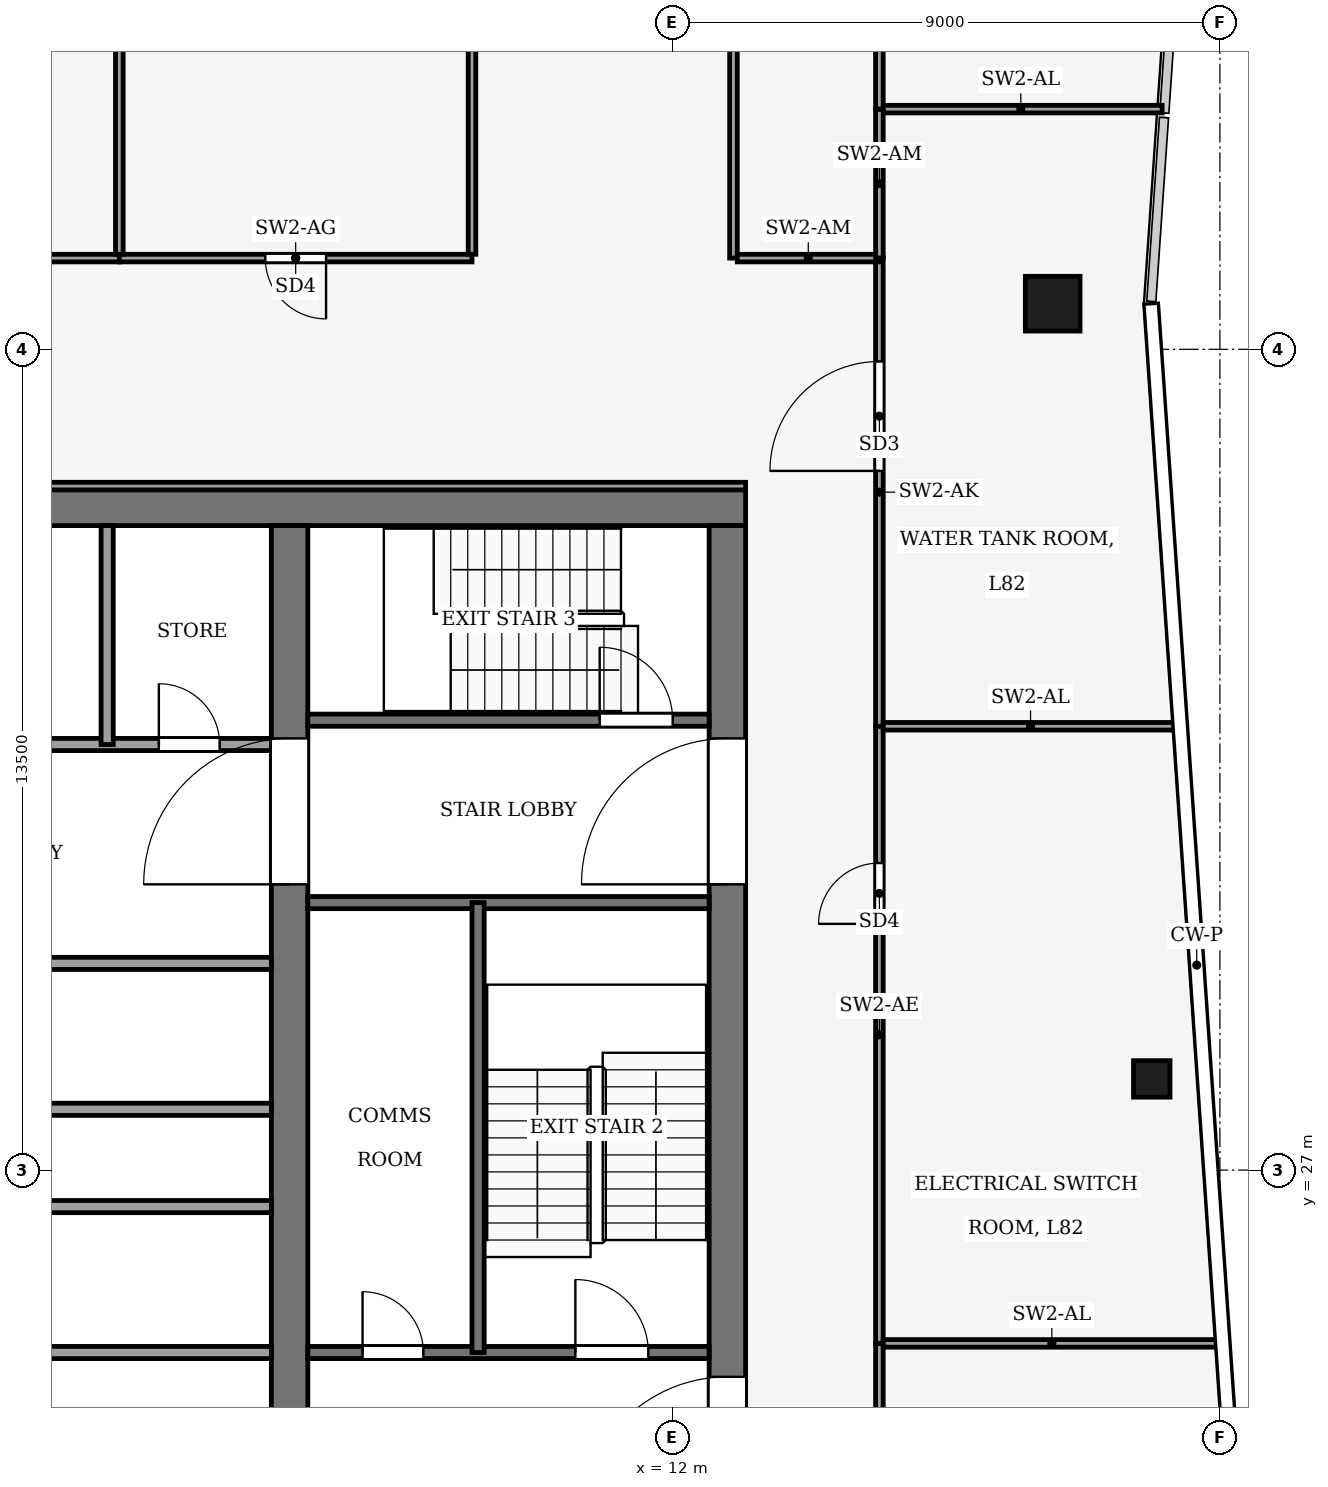
"""IFC4 building model, lengths in metres.
Left out: names, types, materials, properties, quantities, classifications, styles, units other than length and angle.
Written with IfcOpenShell. Run it as: python <this file> out.ifc"""

import sys

from ifc_helpers import new_model, si_unit, direction, frame, frame_2d, origin, origin_2d, place, context, subcontext, project, spatial, rectangle, hollow_rectangle, extrude, element, fill, save


model = new_model("IFC4")
c1 = context("Model", 3, precision=1e-05, world=origin(), true_north=direction((0.0, 1.0)))
c2 = subcontext(c1, "Body", "Model", "MODEL_VIEW")
j1 = project(units=[si_unit("LENGTHUNIT", "METRE"), si_unit("PLANEANGLEUNIT", "RADIAN")], contexts=[c1])
p1 = place(None, origin())
s1 = spatial("IfcSite", under=j1, at=p1, CompositionType="ELEMENT")
p2 = place(p1, origin())
s2 = spatial("IfcBuilding", under=s1, at=p2, CompositionType="ELEMENT")
p3 = place(p2, frame((0.0, 0.0, 364.0)))
s3 = spatial("IfcBuildingStorey", under=s2, at=p3, CompositionType="ELEMENT", Elevation=364.0)
p4 = place(p3, frame((-13.2, 37.9, -0.15), z_axis=(0.0, 0.0, 1.0), x_axis=(1.0, 0.0, 0.0)))
e1 = element("IfcWall", 1, at=p4, inside=s3, PredefinedType="SHEAR", context=c2, shape_type="SweptSolid", body=[
    extrude(rectangle(XDim=26.4, YDim=0.6, at=frame_2d((13.2, 0.0))), origin(), (0.0, 0.0, 1.0), 4.0),
])
p5 = place(p3, frame((12.9, 18.4, -0.15), z_axis=(0.0, 0.0, 1.0), x_axis=(0.0, 1.0, 0.0)))
e2 = element("IfcWall", 2, at=p5, inside=s3, PredefinedType="SHEAR", context=c2, shape_type="SweptSolid", body=[
    extrude(rectangle(XDim=19.2, YDim=0.6, at=frame_2d((9.6, 0.0))), origin(), (0.0, 0.0, 1.0), 4.0),
])
p6 = place(p5, frame((2.8, 0.0, 0.15)))
e3 = element("IfcOpeningElement", 3, at=p6, cuts=e2, PredefinedType="OPENING", context=c2, shape_type="SweptSolid", body=[
    extrude(rectangle(XDim=2.4, YDim=2.4, at=frame_2d((1.2, 1.2))), frame((0.0, 0.31, 0.0), z_axis=(0.0, -1.0, 0.0), x_axis=(1.0, 0.0, 0.0)), (0.0, 0.0, 1.0), 0.62),
])
p7 = place(p5, frame((13.3, 0.0, 0.15)))
e4 = element("IfcOpeningElement", 4, at=p7, cuts=e2, PredefinedType="OPENING", context=c2, shape_type="SweptSolid", body=[
    extrude(rectangle(XDim=2.4, YDim=2.4, at=frame_2d((1.2, 1.2))), frame((0.0, 0.31, 0.0), z_axis=(0.0, -1.0, 0.0), x_axis=(1.0, 0.0, 0.0)), (0.0, 0.0, 1.0), 0.62),
])
p8 = place(p3, frame((5.7, 18.4, -0.15), z_axis=(0.0, 0.0, 1.0), x_axis=(0.0, 1.0, 0.0)))
e5 = element("IfcWall", 5, at=p8, inside=s3, PredefinedType="SHEAR", context=c2, shape_type="SweptSolid", body=[
    extrude(rectangle(XDim=19.2, YDim=0.6, at=frame_2d((9.6, 0.0))), origin(), (0.0, 0.0, 1.0), 4.0),
])
p9 = place(p8, frame((13.3, 0.0, 0.15)))
e6 = element("IfcOpeningElement", 6, at=p9, cuts=e5, PredefinedType="OPENING", context=c2, shape_type="SweptSolid", body=[
    extrude(rectangle(XDim=2.4, YDim=2.4, at=frame_2d((1.2, 1.2))), frame((0.0, 0.31, 0.0), z_axis=(0.0, -1.0, 0.0), x_axis=(1.0, 0.0, 0.0)), (0.0, 0.0, 1.0), 0.62),
])
p10 = place(p3, frame((18.25, 41.25, 0.0), z_axis=(0.0, 0.0, 1.0), x_axis=(1.0, 0.0, 0.0)))
e7 = element("IfcColumn", 7, at=p10, inside=s3, PredefinedType="COLUMN", context=c2, shape_type="SweptSolid", body=[
    extrude(hollow_rectangle(XDim=0.9, YDim=0.9, WallThickness=0.04, at=origin_2d()), origin(), (0.0, 0.0, 1.0), 4.0),
])
p11 = place(p3, frame((19.879, 28.5, 0.0), z_axis=(0.0, 0.0, 1.0), x_axis=(1.0, 0.0, 0.0)))
e8 = element("IfcColumn", 8, at=p11, inside=s3, PredefinedType="COLUMN", context=c2, shape_type="SweptSolid", body=[
    extrude(hollow_rectangle(XDim=0.6, YDim=0.6, WallThickness=0.025, at=origin_2d()), origin(), (0.0, 0.0, 1.0), 4.0),
])
p12 = place(p3, frame((-5.4, 24.0, 0.0), z_axis=(0.0, 0.0, 1.0), x_axis=(1.0, 0.0, 0.0)))
e9 = element("IfcWall", 9, at=p12, inside=s3, PredefinedType="PARTITIONING", context=c2, shape_type="SweptSolid", body=[
    extrude(rectangle(XDim=10.8, YDim=0.2, at=frame_2d((5.4, 0.0))), origin(), (0.0, 0.0, 1.0), 3.85),
])
p13 = place(p12, frame((4.9, 0.0, 0.0)))
e10 = element("IfcOpeningElement", 10, at=p13, cuts=e9, PredefinedType="OPENING", context=c2, shape_type="SweptSolid", body=[
    extrude(rectangle(XDim=1.0, YDim=2.1, at=frame_2d((0.5, 1.05))), frame((0.0, 0.11, 0.0), z_axis=(0.0, -1.0, 0.0), x_axis=(1.0, 0.0, 0.0)), (0.0, 0.0, 1.0), 0.22),
])
p14 = place(p3, frame((6.0, 24.0, 0.0), z_axis=(0.0, 0.0, 1.0), x_axis=(1.0, 0.0, 0.0)))
e11 = element("IfcWall", 11, at=p14, inside=s3, PredefinedType="PARTITIONING", context=c2, shape_type="SweptSolid", body=[
    extrude(rectangle(XDim=6.6, YDim=0.2, at=frame_2d((3.3, 0.0))), origin(), (0.0, 0.0, 1.0), 3.85),
])
p15 = place(p14, frame((0.9, 0.0, 0.0)))
e12 = element("IfcOpeningElement", 12, at=p15, cuts=e11, PredefinedType="OPENING", context=c2, shape_type="SweptSolid", body=[
    extrude(rectangle(XDim=1.0, YDim=2.1, at=frame_2d((0.5, 1.05))), frame((0.0, 0.11, 0.0), z_axis=(0.0, -1.0, 0.0), x_axis=(1.0, 0.0, 0.0)), (0.0, 0.0, 1.0), 0.22),
])
p16 = place(p14, frame((4.4, 0.0, 0.0)))
e13 = element("IfcOpeningElement", 13, at=p16, cuts=e11, PredefinedType="OPENING", context=c2, shape_type="SweptSolid", body=[
    extrude(rectangle(XDim=1.2, YDim=2.2, at=frame_2d((0.6, 1.1))), frame((0.0, 0.11, 0.0), z_axis=(0.0, -1.0, 0.0), x_axis=(1.0, 0.0, 0.0)), (0.0, 0.0, 1.0), 0.22),
])
for number, where, z_axis, x_axis in (
    (14, (-5.4, 26.4, 0.0), (0.0, 0.0, 1.0), (1.0, 0.0, 0.0)),
    (15, (-5.4, 28.0, 0.0), (0.0, 0.0, 1.0), (1.0, 0.0, 0.0)),
):
    element("IfcWall", number, at=place(p3, frame(where, z_axis=z_axis, x_axis=x_axis)), inside=s3, PredefinedType="PARTITIONING", context=c2, shape_type="SweptSolid", body=[
        extrude(rectangle(XDim=10.8, YDim=0.2, at=frame_2d((5.4, 0.0))), origin(), (0.0, 0.0, 1.0), 3.85),
    ])
p17 = place(p3, frame((-5.4, 30.4, 0.0), z_axis=(0.0, 0.0, 1.0), x_axis=(1.0, 0.0, 0.0)))
e16 = element("IfcWall", 16, at=p17, inside=s3, PredefinedType="PARTITIONING", context=c2, shape_type="SweptSolid", body=[
    extrude(rectangle(XDim=10.8, YDim=0.2, at=frame_2d((5.4, 0.0))), origin(), (0.0, 0.0, 1.0), 3.85),
])
p18 = place(p17, frame((4.9, 0.0, 0.0)))
e17 = element("IfcOpeningElement", 17, at=p18, cuts=e16, PredefinedType="OPENING", context=c2, shape_type="SweptSolid", body=[
    extrude(rectangle(XDim=1.0, YDim=2.1, at=frame_2d((0.5, 1.05))), frame((0.0, 0.11, 0.0), z_axis=(0.0, -1.0, 0.0), x_axis=(1.0, 0.0, 0.0)), (0.0, 0.0, 1.0), 0.22),
])
p19 = place(p3, frame((6.0, 31.4, 0.0), z_axis=(0.0, 0.0, 1.0), x_axis=(1.0, 0.0, 0.0)))
e18 = element("IfcWall", 18, at=p19, inside=s3, PredefinedType="PARTITIONING", context=c2, shape_type="SweptSolid", body=[
    extrude(rectangle(XDim=6.6, YDim=0.2, at=frame_2d((3.3, 0.0))), origin(), (0.0, 0.0, 1.0), 3.85),
])
p20 = place(p3, frame((-5.4, 34.0, 0.0), z_axis=(0.0, 0.0, 1.0), x_axis=(1.0, 0.0, 0.0)))
e19 = element("IfcWall", 19, at=p20, inside=s3, PredefinedType="PARTITIONING", context=c2, shape_type="SweptSolid", body=[
    extrude(rectangle(XDim=10.8, YDim=0.2, at=frame_2d((5.4, 0.0))), origin(), (0.0, 0.0, 1.0), 3.85),
])
p21 = place(p20, frame((3.55, 0.0, 0.0)))
e20 = element("IfcOpeningElement", 20, at=p21, cuts=e19, PredefinedType="OPENING", context=c2, shape_type="SweptSolid", body=[
    extrude(rectangle(XDim=1.0, YDim=2.1, at=frame_2d((0.5, 1.05))), frame((0.0, 0.11, 0.0), z_axis=(0.0, -1.0, 0.0), x_axis=(1.0, 0.0, 0.0)), (0.0, 0.0, 1.0), 0.22),
])
p22 = place(p20, frame((8.95, 0.0, 0.0)))
e21 = element("IfcOpeningElement", 21, at=p22, cuts=e19, PredefinedType="OPENING", context=c2, shape_type="SweptSolid", body=[
    extrude(rectangle(XDim=1.0, YDim=2.1, at=frame_2d((0.5, 1.05))), frame((0.0, 0.11, 0.0), z_axis=(0.0, -1.0, 0.0), x_axis=(1.0, 0.0, 0.0)), (0.0, 0.0, 1.0), 0.22),
])
p23 = place(p3, frame((6.0, 34.4, 0.0), z_axis=(0.0, 0.0, 1.0), x_axis=(1.0, 0.0, 0.0)))
e22 = element("IfcWall", 22, at=p23, inside=s3, PredefinedType="PARTITIONING", context=c2, shape_type="SweptSolid", body=[
    extrude(rectangle(XDim=6.6, YDim=0.2, at=frame_2d((3.3, 0.0))), origin(), (0.0, 0.0, 1.0), 3.85),
])
p24 = place(p23, frame((4.8, 0.0, 0.0)))
e23 = element("IfcOpeningElement", 23, at=p24, cuts=e22, PredefinedType="OPENING", context=c2, shape_type="SweptSolid", body=[
    extrude(rectangle(XDim=1.2, YDim=2.2, at=frame_2d((0.6, 1.1))), frame((0.0, 0.11, 0.0), z_axis=(0.0, -1.0, 0.0), x_axis=(1.0, 0.0, 0.0)), (0.0, 0.0, 1.0), 0.22),
])
p25 = place(p3, frame((2.7, 34.0, 0.0), z_axis=(0.0, 0.0, 1.0), x_axis=(0.0, 1.0, 0.0)))
e24 = element("IfcWall", 24, at=p25, inside=s3, PredefinedType="PARTITIONING", context=c2, shape_type="SweptSolid", body=[
    extrude(rectangle(XDim=3.6, YDim=0.2, at=frame_2d((1.8, 0.0))), origin(), (0.0, 0.0, 1.0), 3.85),
])
p26 = place(p3, frame((8.8, 24.0, 0.0), z_axis=(0.0, 0.0, 1.0), x_axis=(0.0, 1.0, 0.0)))
e25 = element("IfcWall", 25, at=p26, inside=s3, PredefinedType="PARTITIONING", context=c2, shape_type="SweptSolid", body=[
    extrude(rectangle(XDim=7.4, YDim=0.2, at=frame_2d((3.7, 0.0))), origin(), (0.0, 0.0, 1.0), 3.85),
])
p27 = place(p3, frame((2.9, 42.0, 0.0), z_axis=(0.0, 0.0, 1.0), x_axis=(-1.0, 0.0, 0.0)))
e26 = element("IfcWall", 26, at=p27, inside=s3, PredefinedType="PARTITIONING", context=c2, shape_type="SweptSolid", body=[
    extrude(rectangle(XDim=5.8, YDim=0.125, at=frame_2d((2.9, 0.0))), origin(), (0.0, 0.0, 1.0), 3.37),
])
p28 = place(p27, frame((2.0, 0.0, 0.0)))
e27 = element("IfcOpeningElement", 27, at=p28, cuts=e26, PredefinedType="OPENING", context=c2, shape_type="SweptSolid", body=[
    extrude(rectangle(XDim=1.8, YDim=2.4, at=frame_2d((0.9, 1.2))), frame((0.0, 0.073, 0.0), z_axis=(0.0, -1.0, 0.0), x_axis=(1.0, 0.0, 0.0)), (0.0, 0.0, 1.0), 0.145),
])
p29 = place(p3, frame((8.7, 42.0, 0.0), z_axis=(0.0, 0.0, 1.0), x_axis=(-1.0, 0.0, 0.0)))
e28 = element("IfcWall", 28, at=p29, inside=s3, PredefinedType="PARTITIONING", context=c2, shape_type="SweptSolid", body=[
    extrude(rectangle(XDim=5.8, YDim=0.125, at=frame_2d((2.9, 0.0))), origin(), (0.0, 0.0, 1.0), 3.37),
])
p30 = place(p29, frame((2.4, 0.0, 0.0)))
e29 = element("IfcOpeningElement", 29, at=p30, cuts=e28, PredefinedType="OPENING", context=c2, shape_type="SweptSolid", body=[
    extrude(rectangle(XDim=1.0, YDim=2.1, at=frame_2d((0.5, 1.05))), frame((0.0, 0.073, 0.0), z_axis=(0.0, -1.0, 0.0), x_axis=(1.0, 0.0, 0.0)), (0.0, 0.0, 1.0), 0.145),
])
p31 = place(p3, frame((8.7, 42.062, 0.0), z_axis=(0.0, 0.0, 1.0), x_axis=(0.0, 1.0, 0.0)))
e30 = element("IfcWall", 30, at=p31, inside=s3, PredefinedType="PARTITIONING", context=c2, shape_type="SweptSolid", body=[
    extrude(rectangle(XDim=12.538, YDim=0.125, at=frame_2d((6.269, 0.0))), origin(), (0.0, 0.0, 1.0), 3.22),
])
p32 = place(p3, frame((15.4, 13.45, 0.0), z_axis=(0.0, 0.0, 1.0), x_axis=(0.0, 1.0, 0.0)))
e31 = element("IfcWall", 31, at=p32, inside=s3, PredefinedType="PARTITIONING", context=c2, shape_type="SweptSolid", body=[
    extrude(rectangle(XDim=10.7, YDim=0.125, at=frame_2d((5.35, 0.0))), origin(), (0.0, 0.0, 1.0), 2.812),
])
p33 = place(p32, frame((4.739, 0.0, 0.0)))
e32 = element("IfcOpeningElement", 32, at=p33, cuts=e31, PredefinedType="OPENING", context=c2, shape_type="SweptSolid", body=[
    extrude(rectangle(XDim=1.8, YDim=2.4, at=frame_2d((0.9, 1.2))), frame((0.0, 0.073, 0.0), z_axis=(0.0, -1.0, 0.0), x_axis=(1.0, 0.0, 0.0)), (0.0, 0.0, 1.0), 0.145),
])
p34 = place(p3, frame((15.4, 24.15, 0.0), z_axis=(0.0, 0.0, 1.0), x_axis=(0.0, 1.0, 0.0)))
e33 = element("IfcWall", 33, at=p34, inside=s3, PredefinedType="PARTITIONING", context=c2, shape_type="SweptSolid", body=[
    extrude(rectangle(XDim=10.15, YDim=0.125, at=frame_2d((5.075, 0.0))), origin(), (0.0, 0.0, 1.0), 3.52),
])
p35 = place(p34, frame((6.9, 0.0, 0.0)))
e34 = element("IfcOpeningElement", 34, at=p35, cuts=e33, PredefinedType="OPENING", context=c2, shape_type="SweptSolid", body=[
    extrude(rectangle(XDim=1.0, YDim=2.1, at=frame_2d((0.5, 1.05))), frame((0.0, 0.073, 0.0), z_axis=(0.0, -1.0, 0.0), x_axis=(1.0, 0.0, 0.0)), (0.0, 0.0, 1.0), 0.145),
])
p36 = place(p3, frame((15.4, 34.3, 0.0), z_axis=(0.0, 0.0, 1.0), x_axis=(0.0, 1.0, 0.0)))
e35 = element("IfcWall", 35, at=p36, inside=s3, PredefinedType="PARTITIONING", context=c2, shape_type="SweptSolid", body=[
    extrude(rectangle(XDim=7.7, YDim=0.125, at=frame_2d((3.85, 0.0))), origin(), (0.0, 0.0, 1.0), 3.12),
])
p37 = place(p36, frame((4.2, 0.0, 0.0)))
e36 = element("IfcOpeningElement", 36, at=p37, cuts=e35, PredefinedType="OPENING", context=c2, shape_type="SweptSolid", body=[
    extrude(rectangle(XDim=1.8, YDim=2.4, at=frame_2d((0.9, 1.2))), frame((0.0, 0.073, 0.0), z_axis=(0.0, -1.0, 0.0), x_axis=(1.0, 0.0, 0.0)), (0.0, 0.0, 1.0), 0.145),
])
p38 = place(p3, frame((2.9, 54.538, 0.0), z_axis=(0.0, 0.0, 1.0), x_axis=(0.0, -1.0, 0.0)))
e37 = element("IfcWall", 37, at=p38, inside=s3, PredefinedType="PARTITIONING", context=c2, shape_type="SweptSolid", body=[
    extrude(rectangle(XDim=12.475, YDim=0.125, at=frame_2d((6.238, 0.0))), origin(), (0.0, 0.0, 1.0), 3.22),
])
p39 = place(p3, frame((15.462, 24.15, 0.0), z_axis=(0.0, 0.0, 1.0), x_axis=(1.0, 0.0, 0.0)))
e38 = element("IfcWall", 38, at=p39, inside=s3, PredefinedType="PARTITIONING", context=c2, shape_type="SweptSolid", body=[
    extrude(rectangle(XDim=5.547, YDim=0.125, at=frame_2d((2.773, 0.0))), origin(), (0.0, 0.0, 1.0), 3.02),
])
p40 = place(p3, frame((15.462, 34.3, 0.0), z_axis=(0.0, 0.0, 1.0), x_axis=(1.0, 0.0, 0.0)))
e39 = element("IfcWall", 39, at=p40, inside=s3, PredefinedType="PARTITIONING", context=c2, shape_type="SweptSolid", body=[
    extrude(rectangle(XDim=4.847, YDim=0.125, at=frame_2d((2.423, 0.0))), origin(), (0.0, 0.0, 1.0), 3.02),
])
p41 = place(p3, frame((15.4, 44.45, 0.0), z_axis=(0.0, 0.0, 1.0), x_axis=(1.0, 0.0, 0.0)))
e40 = element("IfcWall", 40, at=p41, inside=s3, PredefinedType="PARTITIONING", context=c2, shape_type="SweptSolid", body=[
    extrude(rectangle(XDim=4.651, YDim=0.125, at=frame_2d((2.325, 0.0))), origin(), (0.0, 0.0, 1.0), 3.02),
])
p42 = place(p3, frame((13.2, 38.25, 0.0), z_axis=(0.0, 0.0, 1.0), x_axis=(-1.0, 0.0, 0.0)))
e41 = element("IfcWall", 41, at=p42, inside=s3, PredefinedType="PARTITIONING", context=c2, shape_type="SweptSolid", body=[
    extrude(rectangle(XDim=26.4, YDim=0.125, at=frame_2d((13.2, 0.0))), origin(), (0.0, 0.0, 1.0), 3.37),
])
p43 = place(p3, frame((13.0, 54.538, 0.0), z_axis=(0.0, 0.0, 1.0), x_axis=(0.0, -1.0, 0.0)))
e42 = element("IfcWall", 42, at=p43, inside=s3, PredefinedType="PARTITIONING", context=c2, shape_type="SweptSolid", body=[
    extrude(rectangle(XDim=12.538, YDim=0.125, at=frame_2d((6.269, 0.0))), origin(), (0.0, 0.0, 1.0), 3.33),
])
p44 = place(p3, frame((13.062, 42.0, 0.0), z_axis=(0.0, 0.0, 1.0), x_axis=(1.0, 0.0, 0.0)))
e43 = element("IfcWall", 43, at=p44, inside=s3, PredefinedType="PARTITIONING", context=c2, shape_type="SweptSolid", body=[
    extrude(rectangle(XDim=2.335, YDim=0.125, at=frame_2d((1.168, 0.0))), origin(), (0.0, 0.0, 1.0), 3.85),
])
p45 = place(p3, frame((15.4, 42.002, 0.0), z_axis=(0.0, 0.0, 1.0), x_axis=(0.0, 1.0, 0.0)))
e44 = element("IfcWall", 44, at=p45, inside=s3, PredefinedType="PARTITIONING", context=c2, shape_type="SweptSolid", body=[
    extrude(rectangle(XDim=2.446, YDim=0.125, at=frame_2d((1.223, 0.0))), origin(), (0.0, 0.0, 1.0), 3.85),
])
p46 = place(p3, frame((15.4, 44.452, 0.0), z_axis=(0.0, 0.0, 1.0), x_axis=(0.0, 1.0, 0.0)))
e45 = element("IfcWall", 45, at=p46, inside=s3, PredefinedType="PARTITIONING", context=c2, shape_type="SweptSolid", body=[
    extrude(rectangle(XDim=10.146, YDim=0.125, at=frame_2d((5.073, 0.0))), origin(), (0.0, 0.0, 1.0), 3.33),
])
p47 = place(p15, origin())
e46 = element("IfcDoor", 46, at=p47, inside=s3, OperationType="SINGLE_SWING_RIGHT", PredefinedType="DOOR", context=c2, shape_type="SweptSolid", body=[
    extrude(rectangle(XDim=1.0, YDim=2.1, at=frame_2d((0.5, 1.05))), frame((0.0, 0.025, 0.0), z_axis=(0.0, -1.0, 0.0), x_axis=(1.0, 0.0, 0.0)), (0.0, 0.0, 1.0), 0.05),
])
fill(e12, e46)
p48 = place(p22, origin())
e47 = element("IfcDoor", 47, at=p48, inside=s3, OperationType="SINGLE_SWING_LEFT", PredefinedType="DOOR", context=c2, shape_type="SweptSolid", body=[
    extrude(rectangle(XDim=1.0, YDim=2.1, at=frame_2d((0.5, 1.05))), frame((0.0, 0.025, 0.0), z_axis=(0.0, -1.0, 0.0), x_axis=(1.0, 0.0, 0.0)), (0.0, 0.0, 1.0), 0.05),
])
fill(e21, e47)
p49 = place(p16, origin())
e48 = element("IfcDoor", 48, at=p49, inside=s3, OperationType="SINGLE_SWING_RIGHT", PredefinedType="DOOR", context=c2, shape_type="SweptSolid", body=[
    extrude(rectangle(XDim=1.2, YDim=2.2, at=frame_2d((0.6, 1.1))), frame((0.0, 0.025, 0.0), z_axis=(0.0, -1.0, 0.0), x_axis=(1.0, 0.0, 0.0)), (0.0, 0.0, 1.0), 0.05),
])
fill(e13, e48)
p50 = place(p24, origin())
e49 = element("IfcDoor", 49, at=p50, inside=s3, OperationType="SINGLE_SWING_LEFT", PredefinedType="DOOR", context=c2, shape_type="SweptSolid", body=[
    extrude(rectangle(XDim=1.2, YDim=2.2, at=frame_2d((0.6, 1.1))), frame((0.0, 0.025, 0.0), z_axis=(0.0, -1.0, 0.0), x_axis=(1.0, 0.0, 0.0)), (0.0, 0.0, 1.0), 0.05),
])
fill(e23, e49)
p51 = place(p9, origin())
e50 = element("IfcDoor", 50, at=p51, inside=s3, OperationType="DOUBLE_DOOR_SINGLE_SWING", PredefinedType="DOOR", context=c2, shape_type="SweptSolid", body=[
    extrude(rectangle(XDim=2.4, YDim=2.4, at=frame_2d((1.2, 1.2))), frame((0.0, 0.025, 0.0), z_axis=(0.0, -1.0, 0.0), x_axis=(1.0, 0.0, 0.0)), (0.0, 0.0, 1.0), 0.05),
])
fill(e6, e50)
p52 = place(p6, origin())
e51 = element("IfcDoor", 51, at=p52, inside=s3, OperationType="DOUBLE_DOOR_SINGLE_SWING", PredefinedType="DOOR", context=c2, shape_type="SweptSolid", body=[
    extrude(rectangle(XDim=2.4, YDim=2.4, at=frame_2d((1.2, 1.2))), frame((0.0, 0.025, 0.0), z_axis=(0.0, -1.0, 0.0), x_axis=(1.0, 0.0, 0.0)), (0.0, 0.0, 1.0), 0.05),
])
fill(e3, e51)
p53 = place(p7, origin())
e52 = element("IfcDoor", 52, at=p53, inside=s3, OperationType="DOUBLE_DOOR_SINGLE_SWING", PredefinedType="DOOR", context=c2, shape_type="SweptSolid", body=[
    extrude(rectangle(XDim=2.4, YDim=2.4, at=frame_2d((1.2, 1.2))), frame((0.0, 0.025, 0.0), z_axis=(0.0, -1.0, 0.0), x_axis=(1.0, 0.0, 0.0)), (0.0, 0.0, 1.0), 0.05),
])
fill(e4, e52)
p54 = place(p30, origin())
e53 = element("IfcDoor", 53, at=p54, inside=s3, OperationType="SINGLE_SWING_LEFT", PredefinedType="DOOR", context=c2, shape_type="SweptSolid", body=[
    extrude(rectangle(XDim=1.0, YDim=2.1, at=frame_2d((0.5, 1.05))), frame((0.0, 0.025, 0.0), z_axis=(0.0, -1.0, 0.0), x_axis=(1.0, 0.0, 0.0)), (0.0, 0.0, 1.0), 0.05),
])
fill(e29, e53)
p55 = place(p35, origin())
e54 = element("IfcDoor", 54, at=p55, inside=s3, OperationType="SINGLE_SWING_RIGHT", PredefinedType="DOOR", context=c2, shape_type="SweptSolid", body=[
    extrude(rectangle(XDim=1.0, YDim=2.1, at=frame_2d((0.5, 1.05))), frame((0.0, 0.025, 0.0), z_axis=(0.0, -1.0, 0.0), x_axis=(1.0, 0.0, 0.0)), (0.0, 0.0, 1.0), 0.05),
])
fill(e34, e54)
p56 = place(p37, origin())
e55 = element("IfcDoor", 55, at=p56, inside=s3, OperationType="DOUBLE_DOOR_SINGLE_SWING", PredefinedType="DOOR", context=c2, shape_type="SweptSolid", body=[
    extrude(rectangle(XDim=1.8, YDim=2.4, at=frame_2d((0.9, 1.2))), frame((0.0, 0.025, 0.0), z_axis=(0.0, -1.0, 0.0), x_axis=(1.0, 0.0, 0.0)), (0.0, 0.0, 1.0), 0.05),
])
fill(e36, e55)
save(model, sys.argv[1])
